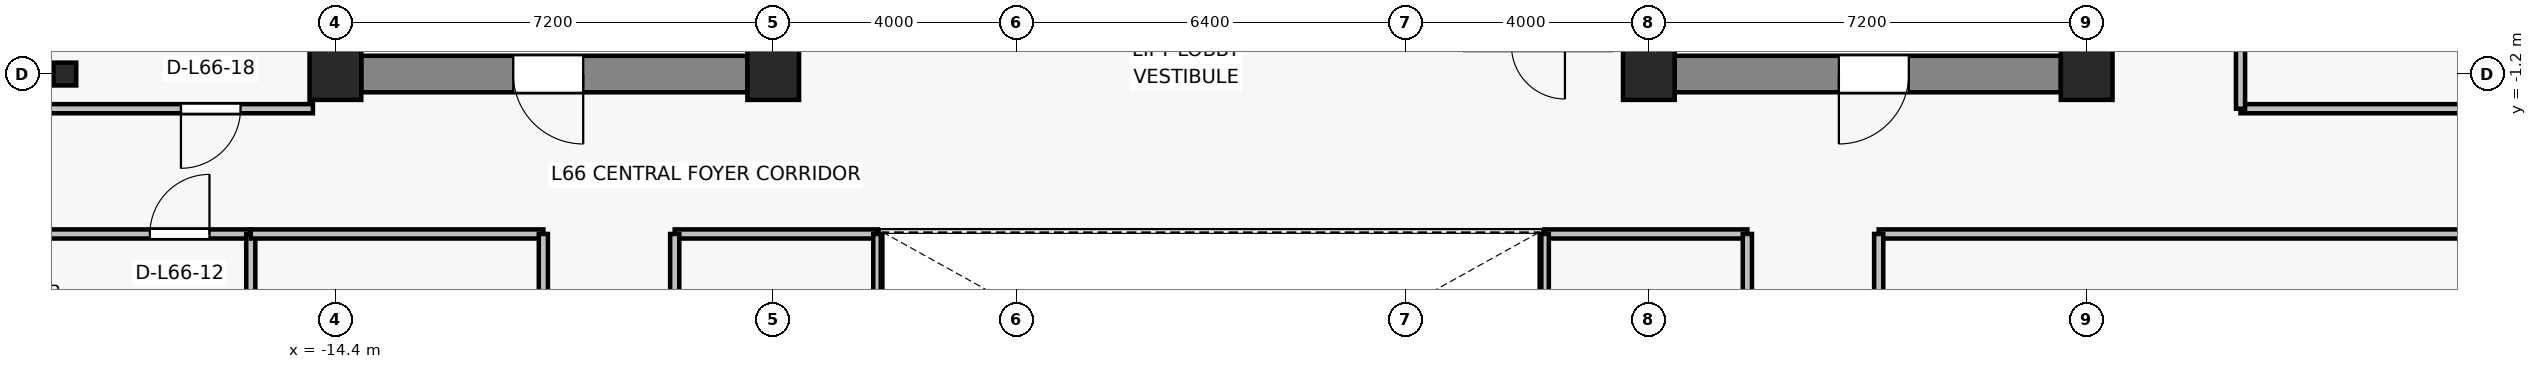
"""IFC4 building model, lengths in metres.
Left out: names, types, materials, properties, quantities, classifications, styles, units other than length and angle.
Written with IfcOpenShell. Run it as: python <this file> out.ifc"""

import sys

from ifc_helpers import new_model, si_unit, direction, frame, frame_2d, origin, origin_2d, place, context, subcontext, project, spatial, rectangle, i_section, extrude, source, transform, mapped, element, fill, save


model = new_model("IFC4")
c1 = context("Model", 3, precision=1e-05, world=origin(), true_north=direction((0.0, 1.0)))
c2 = subcontext(c1, "Body", "Model", "MODEL_VIEW")
j1 = project(units=[si_unit("LENGTHUNIT", "METRE"), si_unit("PLANEANGLEUNIT", "RADIAN")], contexts=[c1])
p1 = place(None, origin())
s1 = spatial("IfcSite", under=j1, at=p1, CompositionType="ELEMENT")
p2 = place(p1, origin())
s2 = spatial("IfcBuilding", under=s1, at=p2, CompositionType="ELEMENT")
p3 = place(p2, frame((0.0, 0.0, 235.3)))
s3 = spatial("IfcBuildingStorey", under=s2, at=p3, CompositionType="ELEMENT", Elevation=235.3)
for number, where, z_axis, x_axis in (
    (1, (-14.4, -1.2, 0.0), (0.0, 0.0, 1.0), (1.0, 0.0, 0.0)),
    (2, (-7.2, -1.2, 0.0), (0.0, 0.0, 1.0), (1.0, 0.0, 0.0)),
    (3, (7.2, -1.2, 0.0), (0.0, 0.0, 1.0), (1.0, 0.0, 0.0)),
    (4, (14.4, -1.2, 0.0), (0.0, 0.0, 1.0), (1.0, 0.0, 0.0)),
):
    element("IfcColumn", number, at=place(p3, frame(where, z_axis=z_axis, x_axis=x_axis)), inside=s3, PredefinedType="COLUMN", context=c2, shape_type="SweptSolid", body=[
        extrude(rectangle(XDim=0.85, YDim=0.85, at=origin_2d()), origin(), (0.0, 0.0, 1.0), 3.3),
    ])
p4 = place(p3, frame((-18.85, -1.2, 0.0), z_axis=(0.0, 0.0, 1.0), x_axis=(1.0, 0.0, 0.0)))
e5 = element("IfcColumn", 5, at=p4, inside=s3, PredefinedType="COLUMN", context=c2, shape_type="SweptSolid", body=[
    extrude(i_section(OverallWidth=0.375, OverallDepth=0.375, WebThickness=0.017, FlangeThickness=0.027, FilletRadius=0.015, at=origin_2d()), origin(), (0.0, 0.0, 1.0), 3.3),
])
p5 = place(p3, frame((-7.625, -1.2, 0.0), z_axis=(0.0, 0.0, 1.0), x_axis=(-1.0, 0.0, 0.0)))
e6 = element("IfcWall", 6, at=p5, inside=s3, PredefinedType="SHEAR", context=c2, shape_type="SweptSolid", body=[
    extrude(rectangle(XDim=6.35, YDim=0.6, at=frame_2d((3.175, 0.0))), origin(), (0.0, 0.0, 1.0), 3.075),
])
p6 = place(p5, frame((2.7, 0.0, 0.0)))
e7 = element("IfcOpeningElement", 7, at=p6, cuts=e6, PredefinedType="OPENING", context=c2, shape_type="SweptSolid", body=[
    extrude(rectangle(XDim=1.15, YDim=2.15, at=frame_2d((0.575, 1.075))), frame((0.0, 0.31, 0.0), z_axis=(0.0, -1.0, 0.0), x_axis=(1.0, 0.0, 0.0)), (0.0, 0.0, 1.0), 0.62),
])
p7 = place(p3, frame((13.975, -1.2, 0.0), z_axis=(0.0, 0.0, 1.0), x_axis=(-1.0, 0.0, 0.0)))
e8 = element("IfcWall", 8, at=p7, inside=s3, PredefinedType="SHEAR", context=c2, shape_type="SweptSolid", body=[
    extrude(rectangle(XDim=6.35, YDim=0.6, at=frame_2d((3.175, 0.0))), origin(), (0.0, 0.0, 1.0), 3.075),
])
p8 = place(p7, frame((2.5, 0.0, 0.0)))
e9 = element("IfcOpeningElement", 9, at=p8, cuts=e8, PredefinedType="OPENING", context=c2, shape_type="SweptSolid", body=[
    extrude(rectangle(XDim=1.15, YDim=2.15, at=frame_2d((0.575, 1.075))), frame((0.0, 0.31, 0.0), z_axis=(0.0, -1.0, 0.0), x_axis=(1.0, 0.0, 0.0)), (0.0, 0.0, 1.0), 0.62),
])
for number, where, z_axis, x_axis in (
    (10, (-7.4, -0.9, 0.0), (0.0, 0.0, 1.0), (0.0, 1.0, 0.0)),
    (11, (7.4, -0.9, 0.0), (0.0, 0.0, 1.0), (0.0, 1.0, 0.0)),
):
    element("IfcWall", number, at=place(p3, frame(where, z_axis=z_axis, x_axis=x_axis)), inside=s3, PredefinedType="SHEAR", context=c2, shape_type="SweptSolid", body=[
        extrude(rectangle(XDim=4.15, YDim=0.45, at=frame_2d((2.075, 0.0))), origin(), (0.0, 0.0, 1.0), 3.075),
    ])
p9 = place(p3, frame((-19.53, -3.83, 0.0), z_axis=(0.0, 0.0, 1.0), x_axis=(1.0, 0.0, 0.0)))
e12 = element("IfcWall", 12, at=p9, inside=s3, PredefinedType="PARTITIONING", context=c2, shape_type="SweptSolid", body=[
    extrude(rectangle(XDim=3.738, YDim=0.15, at=frame_2d((1.869, 0.0))), origin(), (0.0, 0.0, 1.0), 2.765),
])
p10 = place(p9, frame((2.079, 0.0, 0.0)))
e13 = element("IfcOpeningElement", 13, at=p10, cuts=e12, PredefinedType="OPENING", context=c2, shape_type="SweptSolid", body=[
    extrude(rectangle(XDim=0.98, YDim=2.15, at=frame_2d((0.49, 1.075))), frame((0.0, 0.085, 0.0), z_axis=(0.0, -1.0, 0.0), x_axis=(1.0, 0.0, 0.0)), (0.0, 0.0, 1.0), 0.17),
])
p11 = place(p3, frame((-15.792, -3.83, 0.0), z_axis=(0.0, 0.0, 1.0), x_axis=(0.0, -1.0, 0.0)))
e14 = element("IfcWall", 14, at=p11, inside=s3, PredefinedType="PARTITIONING", context=c2, shape_type="SweptSolid", body=[
    extrude(rectangle(XDim=13.2, YDim=0.15, at=frame_2d((6.6, 0.0))), origin(), (0.0, 0.0, 1.0), 2.615),
])
p12 = place(p3, frame((-15.792, -3.83, 0.0), z_axis=(0.0, 0.0, 1.0), x_axis=(1.0, 0.0, 0.0)))
e15 = element("IfcWall", 15, at=p12, inside=s3, PredefinedType="PARTITIONING", context=c2, shape_type="SweptSolid", body=[
    extrude(rectangle(XDim=4.812, YDim=0.15, at=frame_2d((2.406, 0.0))), origin(), (0.0, 0.0, 1.0), 2.615),
])
p13 = place(p3, frame((-10.98, -3.83, 0.0), z_axis=(0.0, 0.0, 1.0), x_axis=(0.0, -1.0, 0.0)))
e16 = element("IfcWall", 16, at=p13, inside=s3, PredefinedType="PARTITIONING", context=c2, shape_type="SweptSolid", body=[
    extrude(rectangle(XDim=13.2, YDim=0.15, at=frame_2d((6.6, 0.0))), origin(), (0.0, 0.0, 1.0), 2.615),
])
p14 = place(p13, frame((2.88, 0.0, 0.0)))
e17 = element("IfcOpeningElement", 17, at=p14, cuts=e16, PredefinedType="OPENING", context=c2, shape_type="SweptSolid", body=[
    extrude(rectangle(XDim=0.98, YDim=2.15, at=frame_2d((0.49, 1.075))), frame((0.0, 0.085, 0.0), z_axis=(0.0, -1.0, 0.0), x_axis=(1.0, 0.0, 0.0)), (0.0, 0.0, 1.0), 0.17),
])
p15 = place(p3, frame((10.98, -3.83, 0.0), z_axis=(0.0, 0.0, 1.0), x_axis=(1.0, 0.0, 0.0)))
e18 = element("IfcWall", 18, at=p15, inside=s3, PredefinedType="PARTITIONING", context=c2, shape_type="SweptSolid", body=[
    extrude(rectangle(XDim=12.55, YDim=0.15, at=frame_2d((6.275, 0.0))), origin(), (0.0, 0.0, 1.0), 2.615),
])
p16 = place(p3, frame((10.98, -17.03, 0.0), z_axis=(0.0, 0.0, 1.0), x_axis=(0.0, 1.0, 0.0)))
e19 = element("IfcWall", 19, at=p16, inside=s3, PredefinedType="PARTITIONING", context=c2, shape_type="SweptSolid", body=[
    extrude(rectangle(XDim=13.2, YDim=0.15, at=frame_2d((6.6, 0.0))), origin(), (0.0, 0.0, 1.0), 2.615),
])
p17 = place(p16, frame((9.34, 0.0, 0.0)))
e20 = element("IfcOpeningElement", 20, at=p17, cuts=e19, PredefinedType="OPENING", context=c2, shape_type="SweptSolid", body=[
    extrude(rectangle(XDim=0.98, YDim=2.15, at=frame_2d((0.49, 1.075))), frame((0.0, 0.085, 0.0), z_axis=(0.0, -1.0, 0.0), x_axis=(1.0, 0.0, 0.0)), (0.0, 0.0, 1.0), 0.17),
])
p18 = place(p3, frame((-8.82, -3.83, 0.0), z_axis=(0.0, 0.0, 1.0), x_axis=(1.0, 0.0, 0.0)))
e21 = element("IfcWall", 21, at=p18, inside=s3, PredefinedType="PARTITIONING", context=c2, shape_type="SweptSolid", body=[
    extrude(rectangle(XDim=3.34, YDim=0.15, at=frame_2d((1.67, 0.0))), origin(), (0.0, 0.0, 1.0), 2.615),
])
p19 = place(p3, frame((-8.82, -17.03, 0.0), z_axis=(0.0, 0.0, 1.0), x_axis=(0.0, 1.0, 0.0)))
e22 = element("IfcWall", 22, at=p19, inside=s3, PredefinedType="PARTITIONING", context=c2, shape_type="SweptSolid", body=[
    extrude(rectangle(XDim=13.2, YDim=0.15, at=frame_2d((6.6, 0.0))), origin(), (0.0, 0.0, 1.0), 2.615),
])
p20 = place(p19, frame((9.385, 0.0, 0.0)))
e23 = element("IfcOpeningElement", 23, at=p20, cuts=e22, PredefinedType="OPENING", context=c2, shape_type="SweptSolid", body=[
    extrude(rectangle(XDim=0.98, YDim=2.15, at=frame_2d((0.49, 1.075))), frame((0.0, 0.085, 0.0), z_axis=(0.0, -1.0, 0.0), x_axis=(1.0, 0.0, 0.0)), (0.0, 0.0, 1.0), 0.17),
])
p21 = place(p3, frame((-5.48, -3.83, 0.0), z_axis=(0.0, 0.0, 1.0), x_axis=(0.0, -1.0, 0.0)))
e24 = element("IfcWall", 24, at=p21, inside=s3, PredefinedType="PARTITIONING", context=c2, shape_type="SweptSolid", body=[
    extrude(rectangle(XDim=13.2, YDim=0.15, at=frame_2d((6.6, 0.0))), origin(), (0.0, 0.0, 1.0), 2.615),
])
p22 = place(p21, frame((7.22, 0.0, 0.0)))
e25 = element("IfcOpeningElement", 25, at=p22, cuts=e24, PredefinedType="OPENING", context=c2, shape_type="SweptSolid", body=[
    extrude(rectangle(XDim=0.98, YDim=2.15, at=frame_2d((0.49, 1.075))), frame((0.0, 0.085, 0.0), z_axis=(0.0, -1.0, 0.0), x_axis=(1.0, 0.0, 0.0)), (0.0, 0.0, 1.0), 0.17),
])
p23 = place(p3, frame((5.48, -3.83, 0.0), z_axis=(0.0, 0.0, 1.0), x_axis=(1.0, 0.0, 0.0)))
e26 = element("IfcWall", 26, at=p23, inside=s3, PredefinedType="PARTITIONING", context=c2, shape_type="SweptSolid", body=[
    extrude(rectangle(XDim=3.34, YDim=0.15, at=frame_2d((1.67, 0.0))), origin(), (0.0, 0.0, 1.0), 2.615),
])
p24 = place(p3, frame((5.48, -17.03, 0.0), z_axis=(0.0, 0.0, 1.0), x_axis=(0.0, 1.0, 0.0)))
e27 = element("IfcWall", 27, at=p24, inside=s3, PredefinedType="PARTITIONING", context=c2, shape_type="SweptSolid", body=[
    extrude(rectangle(XDim=13.2, YDim=0.15, at=frame_2d((6.6, 0.0))), origin(), (0.0, 0.0, 1.0), 2.615),
])
p25 = place(p3, frame((8.82, -3.83, 0.0), z_axis=(0.0, 0.0, 1.0), x_axis=(0.0, -1.0, 0.0)))
e28 = element("IfcWall", 28, at=p25, inside=s3, PredefinedType="PARTITIONING", context=c2, shape_type="SweptSolid", body=[
    extrude(rectangle(XDim=13.2, YDim=0.15, at=frame_2d((6.6, 0.0))), origin(), (0.0, 0.0, 1.0), 2.615),
])
p26 = place(p25, frame((2.835, 0.0, 0.0)))
e29 = element("IfcOpeningElement", 29, at=p26, cuts=e28, PredefinedType="OPENING", context=c2, shape_type="SweptSolid", body=[
    extrude(rectangle(XDim=0.98, YDim=2.15, at=frame_2d((0.49, 1.075))), frame((0.0, 0.085, 0.0), z_axis=(0.0, -1.0, 0.0), x_axis=(1.0, 0.0, 0.0)), (0.0, 0.0, 1.0), 0.17),
])
p27 = place(p3, frame((-14.77, -1.77, 0.0), z_axis=(0.0, 0.0, 1.0), x_axis=(-1.0, 0.0, 0.0)))
e30 = element("IfcWall", 30, at=p27, inside=s3, PredefinedType="PARTITIONING", context=c2, shape_type="SweptSolid", body=[
    extrude(rectangle(XDim=4.76, YDim=0.15, at=frame_2d((2.38, 0.0))), origin(), (0.0, 0.0, 1.0), 2.765),
])
p28 = place(p27, frame((1.19, 0.0, 0.0)))
e31 = element("IfcOpeningElement", 31, at=p28, cuts=e30, PredefinedType="OPENING", context=c2, shape_type="SweptSolid", body=[
    extrude(rectangle(XDim=0.98, YDim=2.15, at=frame_2d((0.49, 1.075))), frame((0.0, 0.085, 0.0), z_axis=(0.0, -1.0, 0.0), x_axis=(1.0, 0.0, 0.0)), (0.0, 0.0, 1.0), 0.17),
])
p29 = place(p3, frame((23.53, -1.77, 0.0), z_axis=(0.0, 0.0, 1.0), x_axis=(-1.0, 0.0, 0.0)))
e32 = element("IfcWall", 32, at=p29, inside=s3, PredefinedType="PARTITIONING", context=c2, shape_type="SweptSolid", body=[
    extrude(rectangle(XDim=6.6, YDim=0.15, at=frame_2d((3.3, 0.0))), origin(), (0.0, 0.0, 1.0), 2.765),
])
p30 = place(p3, frame((16.93, -1.77, 0.0), z_axis=(0.0, 0.0, 1.0), x_axis=(0.0, 1.0, 0.0)))
e33 = element("IfcWall", 33, at=p30, inside=s3, PredefinedType="PARTITIONING", context=c2, shape_type="SweptSolid", body=[
    extrude(rectangle(XDim=15.65, YDim=0.15, at=frame_2d((7.825, 0.0))), origin(), (0.0, 0.0, 1.0), 2.615),
])
p31 = place(p30, frame((7.335, 0.0, 0.0)))
e34 = element("IfcOpeningElement", 34, at=p31, cuts=e33, PredefinedType="OPENING", context=c2, shape_type="SweptSolid", body=[
    extrude(rectangle(XDim=0.98, YDim=2.15, at=frame_2d((0.49, 1.075))), frame((0.0, 0.085, 0.0), z_axis=(0.0, -1.0, 0.0), x_axis=(1.0, 0.0, 0.0)), (0.0, 0.0, 1.0), 0.17),
])
m1 = source(origin(), c2, "Body", "SweptSolid", [
    extrude(rectangle(XDim=1.15, YDim=2.15, at=frame_2d((0.575, 1.075))), frame((0.0, 0.025, 0.0), z_axis=(0.0, -1.0, 0.0), x_axis=(1.0, 0.0, 0.0)), (0.0, 0.0, 1.0), 0.05),
])
p32 = place(p6, origin())
e35 = element("IfcDoor", 35, at=p32, inside=s3, OperationType="SINGLE_SWING_LEFT", PredefinedType="DOOR", context=c2, shape_type="MappedRepresentation", body=[
    mapped(m1, transform((0.0, 0.0, 0.0), x_axis=(1.0, 0.0, 0.0), y_axis=(0.0, 1.0, 0.0), z_axis=(0.0, 0.0, 1.0), scale=1.0)),
])
fill(e7, e35)
p33 = place(p8, origin())
e36 = element("IfcDoor", 36, at=p33, inside=s3, OperationType="SINGLE_SWING_RIGHT", PredefinedType="DOOR", context=c2, shape_type="MappedRepresentation", body=[
    mapped(m1, transform((0.0, 0.0, 0.0), x_axis=(1.0, 0.0, 0.0), y_axis=(0.0, 1.0, 0.0), z_axis=(0.0, 0.0, 1.0), scale=1.0)),
])
fill(e9, e36)
m2 = source(origin(), c2, "Body", "SweptSolid", [
    extrude(rectangle(XDim=0.98, YDim=2.15, at=frame_2d((0.49, 1.075))), frame((0.0, 0.025, 0.0), z_axis=(0.0, -1.0, 0.0), x_axis=(1.0, 0.0, 0.0)), (0.0, 0.0, 1.0), 0.05),
])
p34 = place(p10, origin())
e37 = element("IfcDoor", 37, at=p34, inside=s3, OperationType="SINGLE_SWING_RIGHT", PredefinedType="DOOR", context=c2, shape_type="MappedRepresentation", body=[
    mapped(m2, transform((0.0, 0.0, 0.0), x_axis=(1.0, 0.0, 0.0), y_axis=(0.0, 1.0, 0.0), z_axis=(0.0, 0.0, 1.0), scale=1.0)),
])
fill(e13, e37)
p35 = place(p28, origin())
e38 = element("IfcDoor", 38, at=p35, inside=s3, OperationType="SINGLE_SWING_RIGHT", PredefinedType="DOOR", context=c2, shape_type="MappedRepresentation", body=[
    mapped(m2, transform((0.0, 0.0, 0.0), x_axis=(1.0, 0.0, 0.0), y_axis=(0.0, 1.0, 0.0), z_axis=(0.0, 0.0, 1.0), scale=1.0)),
])
fill(e31, e38)
save(model, sys.argv[1])
